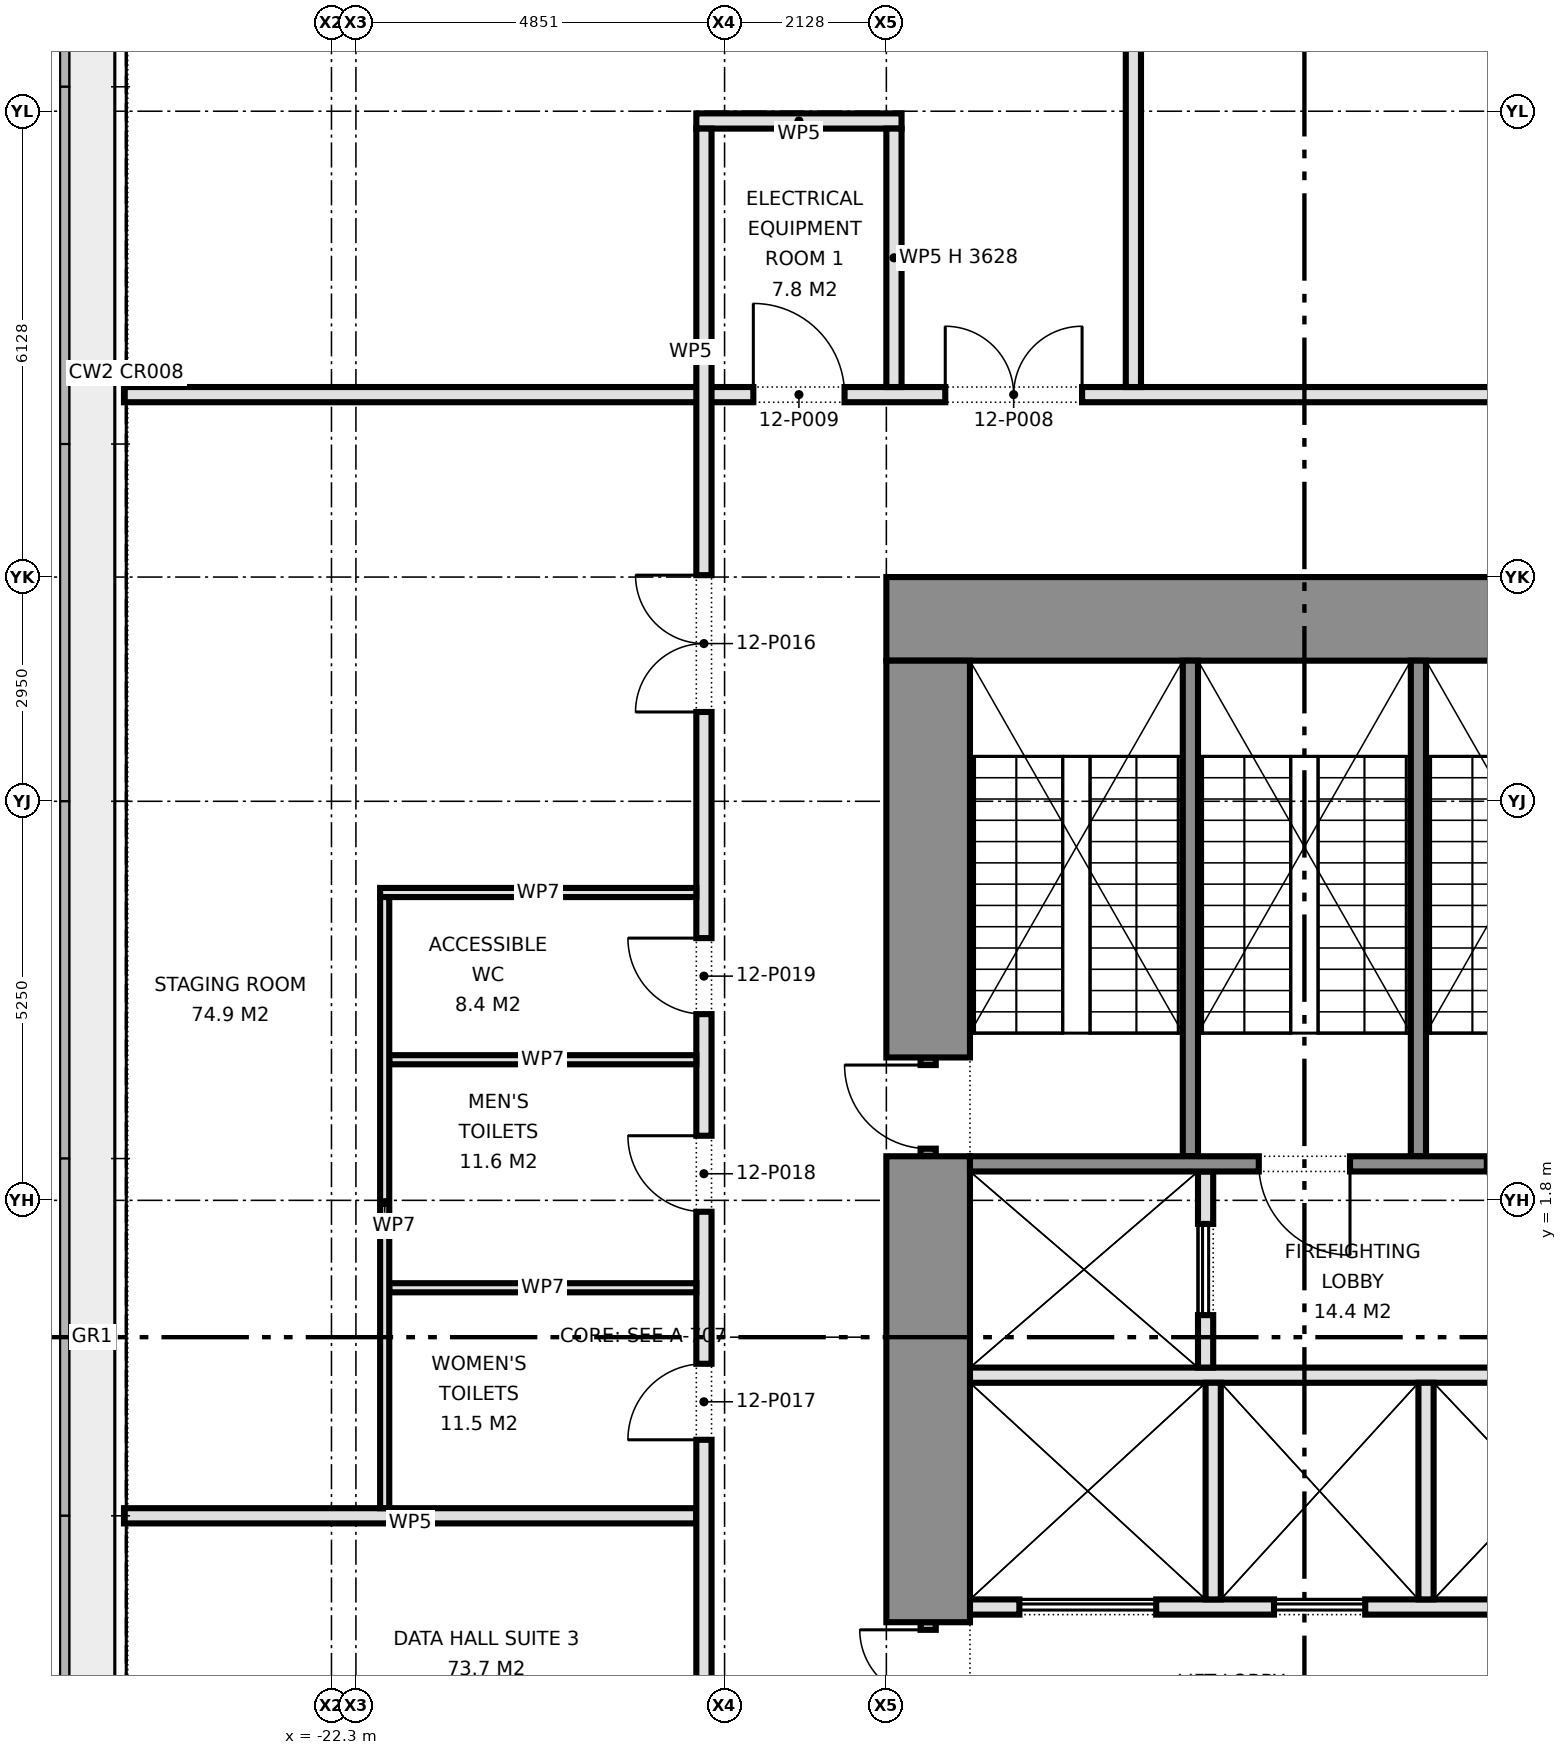
"""IFC4 building model, lengths in metres.
Left out: names, types, materials, properties, quantities, classifications, styles, units other than length and angle.
Written with IfcOpenShell. Run it as: python <this file> out.ifc"""

import sys

from ifc_helpers import new_model, si_unit, direction, frame, frame_2d, origin, place, context, subcontext, project, spatial, rectangle, extrude, element, fill, save


model = new_model("IFC4")
c1 = context("Model", 3, precision=1e-05, world=origin(), true_north=direction((0.0, 1.0)))
c2 = subcontext(c1, "Body", "Model", "MODEL_VIEW")
j1 = project(units=[si_unit("LENGTHUNIT", "METRE"), si_unit("PLANEANGLEUNIT", "RADIAN")], contexts=[c1])
p1 = place(None, origin())
s1 = spatial("IfcSite", under=j1, at=p1, CompositionType="ELEMENT")
p2 = place(p1, origin())
s2 = spatial("IfcBuilding", under=s1, at=p2, CompositionType="ELEMENT")
p3 = place(p2, frame((0.0, 0.0, 54.5)))
s3 = spatial("IfcBuildingStorey", under=s2, at=p3, CompositionType="ELEMENT", Elevation=54.5)
p4 = place(p3, frame((-15.0, 9.45, 0.0), z_axis=(0.0, 0.0, 1.0), x_axis=(1.0, 0.0, 0.0)))
e1 = element("IfcWall", 1, at=p4, inside=s3, PredefinedType="SHEAR", context=c2, shape_type="SweptSolid", body=[
    extrude(rectangle(XDim=11.0, YDim=1.1, at=frame_2d((5.5, 0.0))), origin(), (0.0, 0.0, 1.0), 4.575),
])
p5 = place(p3, frame((-14.45, -5.75, 0.0), z_axis=(0.0, 0.0, 1.0), x_axis=(0.0, 1.0, 0.0)))
e2 = element("IfcWall", 2, at=p5, inside=s3, PredefinedType="PARTITIONING", context=c2, shape_type="SweptSolid", body=[
    extrude(rectangle(XDim=2.0, YDim=0.2, at=frame_2d((1.0, 0.0))), origin(), (0.0, 0.0, 1.0), 2.4),
])
p6 = place(p5, frame((0.1, 0.0, 0.0)))
e3 = element("IfcOpeningElement", 3, at=p6, cuts=e2, PredefinedType="OPENING", context=c2, shape_type="SweptSolid", body=[
    extrude(rectangle(XDim=1.8, YDim=2.1, at=frame_2d((0.9, 1.05))), frame((0.0, 0.11, 0.0), z_axis=(0.0, -1.0, 0.0), x_axis=(1.0, 0.0, 0.0)), (0.0, 0.0, 1.0), 0.22),
])
p7 = place(p3, frame((-14.45, -3.75, 0.0), z_axis=(0.0, 0.0, 1.0), x_axis=(0.0, 1.0, 0.0)))
e4 = element("IfcWall", 4, at=p7, inside=s3, PredefinedType="SHEAR", context=c2, shape_type="SweptSolid", body=[
    extrude(rectangle(XDim=6.13, YDim=1.1, at=frame_2d((3.065, 0.0))), origin(), (0.0, 0.0, 1.0), 4.575),
])
p8 = place(p3, frame((-14.45, 2.38, 0.0), z_axis=(0.0, 0.0, 1.0), x_axis=(0.0, 1.0, 0.0)))
e5 = element("IfcWall", 5, at=p8, inside=s3, PredefinedType="SHEAR", context=c2, shape_type="SweptSolid", body=[
    extrude(rectangle(XDim=1.3, YDim=0.2, at=frame_2d((0.65, 0.0))), origin(), (0.0, 0.0, 1.0), 2.4),
])
p9 = place(p8, frame((0.1, 0.0, 0.0)))
e6 = element("IfcOpeningElement", 6, at=p9, cuts=e5, PredefinedType="OPENING", context=c2, shape_type="SweptSolid", body=[
    extrude(rectangle(XDim=1.1, YDim=2.1, at=frame_2d((0.55, 1.05))), frame((0.0, 0.11, 0.0), z_axis=(0.0, -1.0, 0.0), x_axis=(1.0, 0.0, 0.0)), (0.0, 0.0, 1.0), 0.22),
])
p10 = place(p3, frame((-14.45, 3.68, 0.0), z_axis=(0.0, 0.0, 1.0), x_axis=(0.0, 1.0, 0.0)))
e7 = element("IfcWall", 7, at=p10, inside=s3, PredefinedType="SHEAR", context=c2, shape_type="SweptSolid", body=[
    extrude(rectangle(XDim=5.22, YDim=1.1, at=frame_2d((2.61, 0.0))), origin(), (0.0, 0.0, 1.0), 4.575),
])
p11 = place(p3, frame((-13.9, -3.55, 0.0), z_axis=(0.0, 0.0, 1.0), x_axis=(1.0, 0.0, 0.0)))
e8 = element("IfcWall", 8, at=p11, inside=s3, PredefinedType="PARTITIONING", context=c2, shape_type="SweptSolid", body=[
    extrude(rectangle(XDim=8.8, YDim=0.2, at=frame_2d((4.4, 0.0))), origin(), (0.0, 0.0, 1.0), 4.575),
])
p12 = place(p11, frame((0.65, 0.0, 0.0)))
e9 = element("IfcOpeningElement", 9, at=p12, cuts=e8, PredefinedType="OPENING", context=c2, shape_type="SweptSolid", body=[
    extrude(rectangle(XDim=1.8, YDim=2.1, at=frame_2d((0.9, 1.05))), frame((0.0, 0.11, 0.0), z_axis=(0.0, -1.0, 0.0), x_axis=(1.0, 0.0, 0.0)), (0.0, 0.0, 1.0), 0.22),
])
p13 = place(p11, frame((4.0, 0.0, 0.0)))
e10 = element("IfcOpeningElement", 10, at=p13, cuts=e8, PredefinedType="OPENING", context=c2, shape_type="SweptSolid", body=[
    extrude(rectangle(XDim=1.2, YDim=2.1, at=frame_2d((0.6, 1.05))), frame((0.0, 0.11, 0.0), z_axis=(0.0, -1.0, 0.0), x_axis=(1.0, 0.0, 0.0)), (0.0, 0.0, 1.0), 0.22),
])
p14 = place(p11, frame((6.85, 0.0, 0.0)))
e11 = element("IfcOpeningElement", 11, at=p14, cuts=e8, PredefinedType="OPENING", context=c2, shape_type="SweptSolid", body=[
    extrude(rectangle(XDim=1.2, YDim=2.1, at=frame_2d((0.6, 1.05))), frame((0.0, 0.11, 0.0), z_axis=(0.0, -1.0, 0.0), x_axis=(1.0, 0.0, 0.0)), (0.0, 0.0, 1.0), 0.22),
])
p15 = place(p3, frame((-13.9, -0.5, 0.0), z_axis=(0.0, 0.0, 1.0), x_axis=(1.0, 0.0, 0.0)))
e12 = element("IfcWall", 12, at=p15, inside=s3, PredefinedType="PARTITIONING", context=c2, shape_type="SweptSolid", body=[
    extrude(rectangle(XDim=8.8, YDim=0.2, at=frame_2d((4.4, 0.0))), origin(), (0.0, 0.0, 1.0), 4.575),
])
p16 = place(p3, frame((-10.8, -0.4, 0.0), z_axis=(0.0, 0.0, 1.0), x_axis=(0.0, 1.0, 0.0)))
e13 = element("IfcWall", 13, at=p16, inside=s3, PredefinedType="PARTITIONING", context=c2, shape_type="SweptSolid", body=[
    extrude(rectangle(XDim=2.58, YDim=0.2, at=frame_2d((1.29, 0.0))), origin(), (0.0, 0.0, 1.0), 4.575),
])
p17 = place(p16, frame((0.69, 0.0, 0.0)))
e14 = element("IfcOpeningElement", 14, at=p17, cuts=e13, PredefinedType="OPENING", context=c2, shape_type="SweptSolid", body=[
    extrude(rectangle(XDim=1.2, YDim=2.1, at=frame_2d((0.6, 1.05))), frame((0.0, 0.11, 0.0), z_axis=(0.0, -1.0, 0.0), x_axis=(1.0, 0.0, 0.0)), (0.0, 0.0, 1.0), 0.22),
])
p18 = place(p3, frame((-13.9, 2.28, 0.0), z_axis=(0.0, 0.0, 1.0), x_axis=(1.0, 0.0, 0.0)))
e15 = element("IfcWall", 15, at=p18, inside=s3, PredefinedType="SHEAR", context=c2, shape_type="SweptSolid", body=[
    extrude(rectangle(XDim=8.8, YDim=0.2, at=frame_2d((4.4, 0.0))), origin(), (0.0, 0.0, 1.0), 4.575),
])
p19 = place(p18, frame((3.8, 0.0, 0.0)))
e16 = element("IfcOpeningElement", 16, at=p19, cuts=e15, PredefinedType="OPENING", context=c2, shape_type="SweptSolid", body=[
    extrude(rectangle(XDim=1.2, YDim=2.1, at=frame_2d((0.6, 1.05))), frame((0.0, 0.11, 0.0), z_axis=(0.0, -1.0, 0.0), x_axis=(1.0, 0.0, 0.0)), (0.0, 0.0, 1.0), 0.22),
])
p20 = place(p18, frame((6.8, 0.0, 0.0)))
e17 = element("IfcOpeningElement", 17, at=p20, cuts=e15, PredefinedType="OPENING", context=c2, shape_type="SweptSolid", body=[
    extrude(rectangle(XDim=1.2, YDim=2.1, at=frame_2d((0.6, 1.05))), frame((0.0, 0.11, 0.0), z_axis=(0.0, -1.0, 0.0), x_axis=(1.0, 0.0, 0.0)), (0.0, 0.0, 1.0), 0.22),
])
for number, where, z_axis, x_axis in (
    (18, (-11.0, 2.38, 0.0), (0.0, 0.0, 1.0), (0.0, 1.0, 0.0)),
    (19, (-8.0, 2.38, 0.0), (0.0, 0.0, 1.0), (0.0, 1.0, 0.0)),
):
    element("IfcWall", number, at=place(p3, frame(where, z_axis=z_axis, x_axis=x_axis)), inside=s3, PredefinedType="SHEAR", context=c2, shape_type="SweptSolid", body=[
        extrude(rectangle(XDim=6.52, YDim=0.2, at=frame_2d((3.26, 0.0))), origin(), (0.0, 0.0, 1.0), 4.575),
    ])
for number, where, z_axis, x_axis in (
    (20, (-10.7, -3.45, 0.0), (0.0, 0.0, 1.0), (0.0, 1.0, 0.0)),
    (21, (-7.9, -3.45, 0.0), (0.0, 0.0, 1.0), (0.0, 1.0, 0.0)),
):
    element("IfcWall", number, at=place(p3, frame(where, z_axis=z_axis, x_axis=x_axis)), inside=s3, PredefinedType="PARTITIONING", context=c2, shape_type="SweptSolid", body=[
        extrude(rectangle(XDim=2.85, YDim=0.2, at=frame_2d((1.425, 0.0))), origin(), (0.0, 0.0, 1.0), 4.575),
    ])
p21 = place(p3, frame((-25.03, -2.35, 0.0), z_axis=(0.0, 0.0, 1.0), x_axis=(1.0, 0.0, 0.0)))
e22 = element("IfcWall", 22, at=p21, inside=s3, PredefinedType="PARTITIONING", context=c2, shape_type="SweptSolid", body=[
    extrude(rectangle(XDim=7.53, YDim=0.2, at=frame_2d((3.765, 0.0))), origin(), (0.0, 0.0, 1.0), 4.575),
])
p22 = place(p3, frame((-25.03, 12.4, 0.0), z_axis=(0.0, 0.0, 1.0), x_axis=(1.0, 0.0, 0.0)))
e23 = element("IfcWall", 23, at=p22, inside=s3, PredefinedType="PARTITIONING", context=c2, shape_type="SweptSolid", body=[
    extrude(rectangle(XDim=50.06, YDim=0.2, at=frame_2d((25.03, 0.0))), origin(), (0.0, 0.0, 1.0), 4.575),
])
p23 = place(p22, frame((10.805, 0.0, 0.0)))
e24 = element("IfcOpeningElement", 24, at=p23, cuts=e23, PredefinedType="OPENING", context=c2, shape_type="SweptSolid", body=[
    extrude(rectangle(XDim=1.8, YDim=2.1, at=frame_2d((0.9, 1.05))), frame((0.0, 0.11, 0.0), z_axis=(0.0, -1.0, 0.0), x_axis=(1.0, 0.0, 0.0)), (0.0, 0.0, 1.0), 0.22),
])
p24 = place(p22, frame((8.28, 0.0, 0.0)))
e25 = element("IfcOpeningElement", 25, at=p24, cuts=e23, PredefinedType="OPENING", context=c2, shape_type="SweptSolid", body=[
    extrude(rectangle(XDim=1.2, YDim=2.1, at=frame_2d((0.6, 1.05))), frame((0.0, 0.11, 0.0), z_axis=(0.0, -1.0, 0.0), x_axis=(1.0, 0.0, 0.0)), (0.0, 0.0, 1.0), 0.22),
])
p25 = place(p22, frame((21.78, 0.0, 0.0)))
e26 = element("IfcOpeningElement", 26, at=p25, cuts=e23, PredefinedType="OPENING", context=c2, shape_type="SweptSolid", body=[
    extrude(rectangle(XDim=1.8, YDim=2.1, at=frame_2d((0.9, 1.05))), frame((0.0, 0.11, 0.0), z_axis=(0.0, -1.0, 0.0), x_axis=(1.0, 0.0, 0.0)), (0.0, 0.0, 1.0), 0.22),
])
p26 = place(p22, frame((36.36, 0.0, 0.0)))
e27 = element("IfcOpeningElement", 27, at=p26, cuts=e23, PredefinedType="OPENING", context=c2, shape_type="SweptSolid", body=[
    extrude(rectangle(XDim=1.8, YDim=2.1, at=frame_2d((0.9, 1.05))), frame((0.0, 0.11, 0.0), z_axis=(0.0, -1.0, 0.0), x_axis=(1.0, 0.0, 0.0)), (0.0, 0.0, 1.0), 0.22),
])
p27 = place(p3, frame((-17.5, 16.0, 0.0), z_axis=(0.0, 0.0, 1.0), x_axis=(1.0, 0.0, 0.0)))
e28 = element("IfcWall", 28, at=p27, inside=s3, PredefinedType="PARTITIONING", context=c2, shape_type="SweptSolid", body=[
    extrude(rectangle(XDim=2.7, YDim=0.2, at=frame_2d((1.35, 0.0))), origin(), (0.0, 0.0, 1.0), 4.575),
])
p28 = place(p3, frame((-11.75, 12.5, 0.0), z_axis=(0.0, 0.0, 1.0), x_axis=(0.0, 1.0, 0.0)))
e29 = element("IfcWall", 29, at=p28, inside=s3, PredefinedType="PARTITIONING", context=c2, shape_type="SweptSolid", body=[
    extrude(rectangle(XDim=12.53, YDim=0.2, at=frame_2d((6.265, 0.0))), origin(), (0.0, 0.0, 1.0), 4.575),
])
p29 = place(p3, frame((-14.9, 12.5, 0.0), z_axis=(0.0, 0.0, 1.0), x_axis=(0.0, 1.0, 0.0)))
e30 = element("IfcWall", 30, at=p29, inside=s3, PredefinedType="PARTITIONING", context=c2, shape_type="SweptSolid", body=[
    extrude(rectangle(XDim=3.4, YDim=0.2, at=frame_2d((1.7, 0.0))), origin(), (0.0, 0.0, 1.0), 3.628),
])
p30 = place(p3, frame((-17.4, -12.3, 0.0), z_axis=(0.0, 0.0, 1.0), x_axis=(0.0, 1.0, 0.0)))
e31 = element("IfcWall", 31, at=p30, inside=s3, PredefinedType="PARTITIONING", context=c2, shape_type="SweptSolid", body=[
    extrude(rectangle(XDim=28.2, YDim=0.2, at=frame_2d((14.1, 0.0))), origin(), (0.0, 0.0, 1.0), 4.575),
])
p31 = place(p30, frame((4.025, 0.0, 0.0)))
e32 = element("IfcOpeningElement", 32, at=p31, cuts=e31, PredefinedType="OPENING", context=c2, shape_type="SweptSolid", body=[
    extrude(rectangle(XDim=1.8, YDim=2.1, at=frame_2d((0.9, 1.05))), frame((0.0, 0.11, 0.0), z_axis=(0.0, -1.0, 0.0), x_axis=(1.0, 0.0, 0.0)), (0.0, 0.0, 1.0), 0.22),
])
p32 = place(p30, frame((20.525, 0.0, 0.0)))
e33 = element("IfcOpeningElement", 33, at=p32, cuts=e31, PredefinedType="OPENING", context=c2, shape_type="SweptSolid", body=[
    extrude(rectangle(XDim=1.8, YDim=2.1, at=frame_2d((0.9, 1.05))), frame((0.0, 0.11, 0.0), z_axis=(0.0, -1.0, 0.0), x_axis=(1.0, 0.0, 0.0)), (0.0, 0.0, 1.0), 0.22),
])
p33 = place(p30, frame((10.95, 0.0, 0.0)))
e34 = element("IfcOpeningElement", 34, at=p33, cuts=e31, PredefinedType="OPENING", context=c2, shape_type="SweptSolid", body=[
    extrude(rectangle(XDim=1.0, YDim=2.1, at=frame_2d((0.5, 1.05))), frame((0.0, 0.11, 0.0), z_axis=(0.0, -1.0, 0.0), x_axis=(1.0, 0.0, 0.0)), (0.0, 0.0, 1.0), 0.22),
])
p34 = place(p30, frame((13.95, 0.0, 0.0)))
e35 = element("IfcOpeningElement", 35, at=p34, cuts=e31, PredefinedType="OPENING", context=c2, shape_type="SweptSolid", body=[
    extrude(rectangle(XDim=1.0, YDim=2.1, at=frame_2d((0.5, 1.05))), frame((0.0, 0.11, 0.0), z_axis=(0.0, -1.0, 0.0), x_axis=(1.0, 0.0, 0.0)), (0.0, 0.0, 1.0), 0.22),
])
p35 = place(p30, frame((16.55, 0.0, 0.0)))
e36 = element("IfcOpeningElement", 36, at=p35, cuts=e31, PredefinedType="OPENING", context=c2, shape_type="SweptSolid", body=[
    extrude(rectangle(XDim=1.0, YDim=2.1, at=frame_2d((0.5, 1.05))), frame((0.0, 0.11, 0.0), z_axis=(0.0, -1.0, 0.0), x_axis=(1.0, 0.0, 0.0)), (0.0, 0.0, 1.0), 0.22),
])
for number, where, z_axis, x_axis in (
    (37, (-21.54, 0.65, 0.0), (0.0, 0.0, 1.0), (1.0, 0.0, 0.0)),
    (38, (-21.54, 3.65, 0.0), (0.0, 0.0, 1.0), (1.0, 0.0, 0.0)),
):
    element("IfcWall", number, at=place(p3, frame(where, z_axis=z_axis, x_axis=x_axis)), inside=s3, PredefinedType="PARTITIONING", context=c2, shape_type="SweptSolid", body=[
        extrude(rectangle(XDim=4.04, YDim=0.12, at=frame_2d((2.02, 0.0))), origin(), (0.0, 0.0, 1.0), 4.575),
    ])
p36 = place(p3, frame((-21.66, 5.85, 0.0), z_axis=(0.0, 0.0, 1.0), x_axis=(1.0, 0.0, 0.0)))
e39 = element("IfcWall", 39, at=p36, inside=s3, PredefinedType="PARTITIONING", context=c2, shape_type="SweptSolid", body=[
    extrude(rectangle(XDim=4.16, YDim=0.12, at=frame_2d((2.08, 0.0))), origin(), (0.0, 0.0, 1.0), 4.575),
])
p37 = place(p3, frame((-21.6, -2.25, 0.0), z_axis=(0.0, 0.0, 1.0), x_axis=(0.0, 1.0, 0.0)))
e40 = element("IfcWall", 40, at=p37, inside=s3, PredefinedType="PARTITIONING", context=c2, shape_type="SweptSolid", body=[
    extrude(rectangle(XDim=8.04, YDim=0.12, at=frame_2d((4.02, 0.0))), origin(), (0.0, 0.0, 1.0), 4.575),
])
p38 = place(p6, origin())
e41 = element("IfcDoor", 41, at=p38, inside=s3, OperationType="DOUBLE_DOOR_SINGLE_SWING", PredefinedType="DOOR", context=c2, shape_type="SweptSolid", body=[
    extrude(rectangle(XDim=1.8, YDim=2.1, at=frame_2d((0.9, 1.05))), frame((0.0, 0.025, 0.0), z_axis=(0.0, -1.0, 0.0), x_axis=(1.0, 0.0, 0.0)), (0.0, 0.0, 1.0), 0.05),
])
fill(e3, e41)
p39 = place(p9, origin())
e42 = element("IfcDoor", 42, at=p39, inside=s3, OperationType="SINGLE_SWING_RIGHT", PredefinedType="DOOR", context=c2, shape_type="SweptSolid", body=[
    extrude(rectangle(XDim=1.1, YDim=2.1, at=frame_2d((0.55, 1.05))), frame((0.0, 0.025, 0.0), z_axis=(0.0, -1.0, 0.0), x_axis=(1.0, 0.0, 0.0)), (0.0, 0.0, 1.0), 0.05),
])
fill(e6, e42)
p40 = place(p12, origin())
e43 = element("IfcDoor", 43, at=p40, inside=s3, OperationType="DOUBLE_DOOR_SLIDING", PredefinedType="DOOR", context=c2, shape_type="SweptSolid", body=[
    extrude(rectangle(XDim=1.8, YDim=2.1, at=frame_2d((0.9, 1.05))), frame((0.0, 0.025, 0.0), z_axis=(0.0, -1.0, 0.0), x_axis=(1.0, 0.0, 0.0)), (0.0, 0.0, 1.0), 0.05),
])
fill(e9, e43)
p41 = place(p13, origin())
e44 = element("IfcDoor", 44, at=p41, inside=s3, OperationType="DOUBLE_DOOR_SLIDING", PredefinedType="DOOR", context=c2, shape_type="SweptSolid", body=[
    extrude(rectangle(XDim=1.2, YDim=2.1, at=frame_2d((0.6, 1.05))), frame((0.0, 0.025, 0.0), z_axis=(0.0, -1.0, 0.0), x_axis=(1.0, 0.0, 0.0)), (0.0, 0.0, 1.0), 0.05),
])
fill(e10, e44)
p42 = place(p17, origin())
e45 = element("IfcDoor", 45, at=p42, inside=s3, OperationType="DOUBLE_DOOR_SLIDING", PredefinedType="DOOR", context=c2, shape_type="SweptSolid", body=[
    extrude(rectangle(XDim=1.2, YDim=2.1, at=frame_2d((0.6, 1.05))), frame((0.0, 0.025, 0.0), z_axis=(0.0, -1.0, 0.0), x_axis=(1.0, 0.0, 0.0)), (0.0, 0.0, 1.0), 0.05),
])
fill(e14, e45)
p43 = place(p19, frame((1.2, 0.0, 0.0), z_axis=(0.0, 0.0, 1.0), x_axis=(-1.0, 0.0, 0.0)))
e46 = element("IfcDoor", 46, at=p43, inside=s3, OperationType="SINGLE_SWING_LEFT", PredefinedType="DOOR", context=c2, shape_type="SweptSolid", body=[
    extrude(rectangle(XDim=1.2, YDim=2.1, at=frame_2d((0.6, 1.05))), frame((0.0, 0.025, 0.0), z_axis=(0.0, -1.0, 0.0), x_axis=(1.0, 0.0, 0.0)), (0.0, 0.0, 1.0), 0.05),
])
fill(e16, e46)
p44 = place(p23, origin())
e47 = element("IfcDoor", 47, at=p44, inside=s3, OperationType="DOUBLE_DOOR_SINGLE_SWING", PredefinedType="DOOR", context=c2, shape_type="SweptSolid", body=[
    extrude(rectangle(XDim=1.8, YDim=2.1, at=frame_2d((0.9, 1.05))), frame((0.0, 0.025, 0.0), z_axis=(0.0, -1.0, 0.0), x_axis=(1.0, 0.0, 0.0)), (0.0, 0.0, 1.0), 0.05),
])
fill(e24, e47)
p45 = place(p24, origin())
e48 = element("IfcDoor", 48, at=p45, inside=s3, OperationType="SINGLE_SWING_LEFT", PredefinedType="DOOR", context=c2, shape_type="SweptSolid", body=[
    extrude(rectangle(XDim=1.2, YDim=2.1, at=frame_2d((0.6, 1.05))), frame((0.0, 0.025, 0.0), z_axis=(0.0, -1.0, 0.0), x_axis=(1.0, 0.0, 0.0)), (0.0, 0.0, 1.0), 0.05),
])
fill(e25, e48)
p46 = place(p32, origin())
e49 = element("IfcDoor", 49, at=p46, inside=s3, OperationType="DOUBLE_DOOR_SINGLE_SWING", PredefinedType="DOOR", context=c2, shape_type="SweptSolid", body=[
    extrude(rectangle(XDim=1.8, YDim=2.1, at=frame_2d((0.9, 1.05))), frame((0.0, 0.025, 0.0), z_axis=(0.0, -1.0, 0.0), x_axis=(1.0, 0.0, 0.0)), (0.0, 0.0, 1.0), 0.05),
])
fill(e33, e49)
p47 = place(p33, origin())
e50 = element("IfcDoor", 50, at=p47, inside=s3, OperationType="SINGLE_SWING_LEFT", PredefinedType="DOOR", context=c2, shape_type="SweptSolid", body=[
    extrude(rectangle(XDim=1.0, YDim=2.1, at=frame_2d((0.5, 1.05))), frame((0.0, 0.025, 0.0), z_axis=(0.0, -1.0, 0.0), x_axis=(1.0, 0.0, 0.0)), (0.0, 0.0, 1.0), 0.05),
])
fill(e34, e50)
p48 = place(p34, origin())
e51 = element("IfcDoor", 51, at=p48, inside=s3, OperationType="SINGLE_SWING_RIGHT", PredefinedType="DOOR", context=c2, shape_type="SweptSolid", body=[
    extrude(rectangle(XDim=1.0, YDim=2.1, at=frame_2d((0.5, 1.05))), frame((0.0, 0.025, 0.0), z_axis=(0.0, -1.0, 0.0), x_axis=(1.0, 0.0, 0.0)), (0.0, 0.0, 1.0), 0.05),
])
fill(e35, e51)
p49 = place(p35, origin())
e52 = element("IfcDoor", 52, at=p49, inside=s3, OperationType="SINGLE_SWING_RIGHT", PredefinedType="DOOR", context=c2, shape_type="SweptSolid", body=[
    extrude(rectangle(XDim=1.0, YDim=2.1, at=frame_2d((0.5, 1.05))), frame((0.0, 0.025, 0.0), z_axis=(0.0, -1.0, 0.0), x_axis=(1.0, 0.0, 0.0)), (0.0, 0.0, 1.0), 0.05),
])
fill(e36, e52)
save(model, sys.argv[1])
